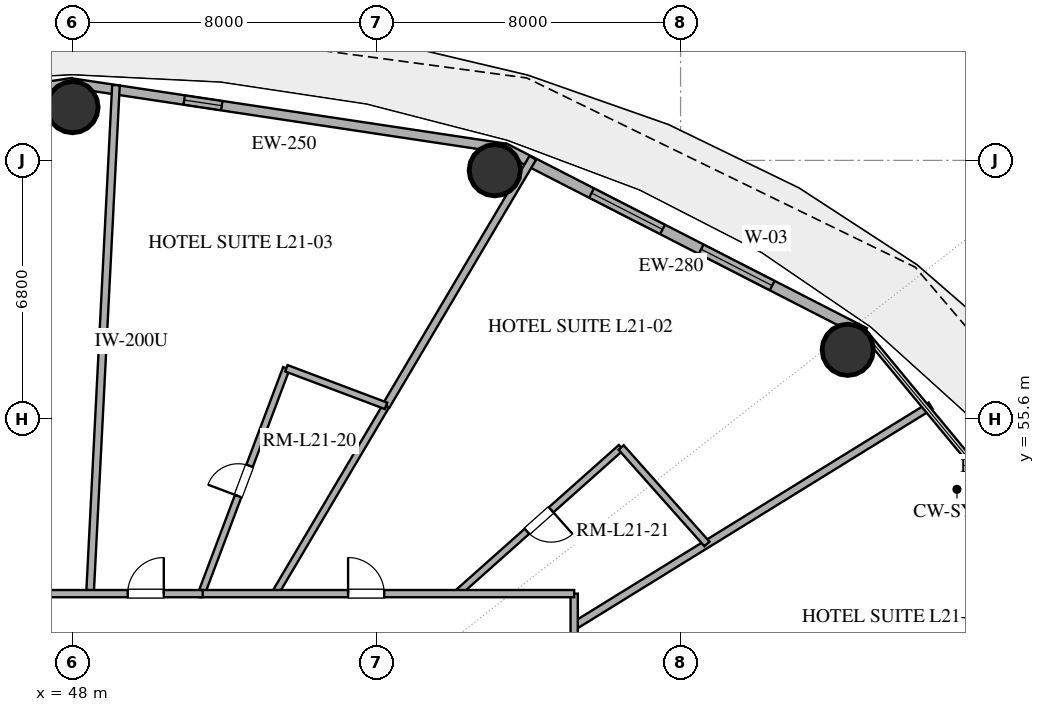
"""IFC4 building model, lengths in metres.
Left out: names, types, materials, properties, quantities, classifications, styles, units other than length and angle.
Written with IfcOpenShell. Run it as: python <this file> out.ifc"""

import sys

from ifc_helpers import new_model, si_unit, direction, frame, frame_2d, origin, origin_2d, place, context, subcontext, project, spatial, rectangle, hollow_circle, extrude, element, fill, save


model = new_model("IFC4")
c1 = context("Model", 3, precision=1e-05, world=origin(), true_north=direction((0.0, 1.0)))
c2 = subcontext(c1, "Body", "Model", "MODEL_VIEW")
j1 = project(units=[si_unit("LENGTHUNIT", "METRE"), si_unit("PLANEANGLEUNIT", "RADIAN")], contexts=[c1])
p1 = place(None, origin())
s1 = spatial("IfcSite", under=j1, at=p1, CompositionType="ELEMENT")
p2 = place(p1, origin())
s2 = spatial("IfcBuilding", under=s1, at=p2, CompositionType="ELEMENT")
p3 = place(p2, frame((0.0, 0.0, 87.6)))
s3 = spatial("IfcBuildingStorey", under=s2, at=p3, CompositionType="ELEMENT", Elevation=87.6)
for number, where, z_axis, x_axis in (
    (1, (68.398, 57.415, 0.0), (0.0, 0.0, 1.0), (1.0, 0.0, 0.0)),
    (2, (59.11, 62.141, 0.0), (0.0, 0.0, 1.0), (1.0, 0.0, 0.0)),
    (3, (48.0, 63.8, 0.0), (0.0, 0.0, 1.0), (1.0, 0.0, 0.0)),
):
    element("IfcColumn", number, at=place(p3, frame(where, z_axis=z_axis, x_axis=x_axis)), inside=s3, PredefinedType="COLUMN", context=c2, shape_type="SweptSolid", body=[
        extrude(hollow_circle(Radius=0.675, WallThickness=0.036, at=origin_2d()), origin(), (0.0, 0.0, 1.0), 3.38),
    ])
p4 = place(p3, frame((68.84, 57.86, 0.0), z_axis=(0.0, 0.0, 1.0), x_axis=(-0.889959505023, 0.45603955905, 0.0)))
e4 = element("IfcWall", 4, at=p4, inside=s3, PredefinedType="SOLIDWALL", context=c2, shape_type="SweptSolid", body=[
    extrude(rectangle(XDim=10.662, YDim=0.28, at=frame_2d((5.331, 0.0))), origin(), (0.0, 0.0, 1.0), 3.38),
])
p5 = place(p4, frame((2.731, 0.0, 0.85)))
e5 = element("IfcOpeningElement", 5, at=p5, cuts=e4, PredefinedType="OPENING", context=c2, shape_type="SweptSolid", body=[
    extrude(rectangle(XDim=2.1, YDim=2.2, at=frame_2d((1.05, 1.1))), frame((0.0, 0.15, 0.0), z_axis=(0.0, -1.0, 0.0), x_axis=(1.0, 0.0, 0.0)), (0.0, 0.0, 1.0), 0.3),
])
p6 = place(p4, frame((5.971, 0.0, 0.85)))
e6 = element("IfcOpeningElement", 6, at=p6, cuts=e4, PredefinedType="OPENING", context=c2, shape_type="SweptSolid", body=[
    extrude(rectangle(XDim=2.1, YDim=2.2, at=frame_2d((1.05, 1.1))), frame((0.0, 0.15, 0.0), z_axis=(0.0, -1.0, 0.0), x_axis=(1.0, 0.0, 0.0)), (0.0, 0.0, 1.0), 0.3),
])
p7 = place(p3, frame((59.351, 62.723, 0.0), z_axis=(0.0, 0.0, 1.0), x_axis=(-0.988877774656, 0.148730450117, 0.0)))
e7 = element("IfcWall", 7, at=p7, inside=s3, PredefinedType="SOLIDWALL", context=c2, shape_type="SweptSolid", body=[
    extrude(rectangle(XDim=11.479, YDim=0.25, at=frame_2d((5.74, 0.0))), origin(), (0.0, 0.0, 1.0), 3.38),
])
p8 = place(p7, frame((7.508, 0.0, 1.42)))
e8 = element("IfcOpeningElement", 8, at=p8, cuts=e7, PredefinedType="OPENING", context=c2, shape_type="SweptSolid", body=[
    extrude(rectangle(XDim=1.0, YDim=1.05, at=frame_2d((0.5, 0.525))), frame((0.0, 0.135, 0.0), z_axis=(0.0, -1.0, 0.0), x_axis=(1.0, 0.0, 0.0)), (0.0, 0.0, 1.0), 0.27),
])
p9 = place(p3, frame((48.0, 64.43, 0.0), z_axis=(0.0, 0.0, 1.0), x_axis=(-0.988877774656, -0.148730450117, 0.0)))
e9 = element("IfcWall", 9, at=p9, inside=s3, PredefinedType="SOLIDWALL", context=c2, shape_type="SweptSolid", body=[
    extrude(rectangle(XDim=11.479, YDim=0.28, at=frame_2d((5.74, 0.0))), origin(), (0.0, 0.0, 1.0), 3.38),
])
p10 = place(p9, frame((1.524, 0.0, 0.0)))
e10 = element("IfcOpeningElement", 10, at=p10, cuts=e9, PredefinedType="OPENING", context=c2, shape_type="SweptSolid", body=[
    extrude(rectangle(XDim=1.1, YDim=2.25, at=frame_2d((0.55, 1.125))), frame((0.0, 0.15, 0.0), z_axis=(0.0, -1.0, 0.0), x_axis=(1.0, 0.0, 0.0)), (0.0, 0.0, 1.0), 0.3),
])
p11 = place(p3, frame((49.143, 64.379, 0.0), z_axis=(0.0, 0.0, 1.0), x_axis=(-0.050973793346, -0.998699991185, 0.0)))
e11 = element("IfcWall", 11, at=p11, inside=s3, PredefinedType="PARTITIONING", context=c2, shape_type="SweptSolid", body=[
    extrude(rectangle(XDim=13.396, YDim=0.2, at=frame_2d((6.698, 0.0))), origin(), (0.0, 0.0, 1.0), 2.74),
])
p12 = place(p3, frame((60.112, 62.468, 0.0), z_axis=(0.0, 0.0, 1.0), x_axis=(-0.509263960295, -0.860610375689, 0.0)))
e12 = element("IfcWall", 12, at=p12, inside=s3, PredefinedType="PARTITIONING", context=c2, shape_type="SweptSolid", body=[
    extrude(rectangle(XDim=7.583, YDim=0.2, at=frame_2d((3.792, 0.0))), origin(), (0.0, 0.0, 1.0), 2.74),
])
p13 = place(p3, frame((61.2, 50.15, 0.0), z_axis=(0.0, 0.0, 1.0), x_axis=(0.850874276333, 0.525369361377, 0.0)))
e13 = element("IfcWall", 13, at=p13, inside=s3, PredefinedType="PARTITIONING", context=c2, shape_type="SweptSolid", body=[
    extrude(rectangle(XDim=11.026, YDim=0.2, at=frame_2d((5.513, 0.0))), origin(), (0.0, 0.0, 1.0), 2.74),
])
p14 = place(p3, frame((51.391, 51.0, 0.0), z_axis=(0.0, 0.0, 1.0), x_axis=(0.352583810303, 0.935780239539, 0.0)))
e14 = element("IfcWall", 14, at=p14, inside=s3, PredefinedType="PLUMBINGWALL", context=c2, shape_type="SweptSolid", body=[
    extrude(rectangle(XDim=6.337, YDim=0.18, at=frame_2d((3.168, 0.0))), origin(), (0.0, 0.0, 1.0), 2.74),
])
p15 = place(p14, frame((2.744, 0.0, 0.0)))
e15 = element("IfcOpeningElement", 15, at=p15, cuts=e14, PredefinedType="OPENING", context=c2, shape_type="SweptSolid", body=[
    extrude(rectangle(XDim=0.85, YDim=2.1, at=frame_2d((0.425, 1.05))), frame((0.0, 0.1, 0.0), z_axis=(0.0, -1.0, 0.0), x_axis=(1.0, 0.0, 0.0)), (0.0, 0.0, 1.0), 0.2),
])
p16 = place(p3, frame((62.436, 54.844, 0.0), z_axis=(0.0, 0.0, 1.0), x_axis=(-0.747085499985, -0.664727956168, 0.0)))
e16 = element("IfcWall", 16, at=p16, inside=s3, PredefinedType="PLUMBINGWALL", context=c2, shape_type="SweptSolid", body=[
    extrude(rectangle(XDim=5.783, YDim=0.18, at=frame_2d((2.892, 0.0))), origin(), (0.0, 0.0, 1.0), 2.74),
])
p17 = place(p16, frame((2.467, 0.0, 0.0)))
e17 = element("IfcOpeningElement", 17, at=p17, cuts=e16, PredefinedType="OPENING", context=c2, shape_type="SweptSolid", body=[
    extrude(rectangle(XDim=0.85, YDim=2.1, at=frame_2d((0.425, 1.05))), frame((0.0, 0.1, 0.0), z_axis=(0.0, -1.0, 0.0), x_axis=(1.0, 0.0, 0.0)), (0.0, 0.0, 1.0), 0.2),
])
p18 = place(p3, frame((56.25, 55.941, 0.0), z_axis=(0.0, 0.0, 1.0), x_axis=(-0.509296473297, -0.860591135376, 0.0)))
e18 = element("IfcWall", 18, at=p18, inside=s3, PredefinedType="PLUMBINGWALL", context=c2, shape_type="SweptSolid", body=[
    extrude(rectangle(XDim=5.742, YDim=0.18, at=frame_2d((2.871, 0.0))), origin(), (0.0, 0.0, 1.0), 2.74),
])
p19 = place(p3, frame((61.2, 51.0, 0.0), z_axis=(0.0, 0.0, 1.0), x_axis=(0.0, -1.0, 0.0)))
e19 = element("IfcWall", 19, at=p19, inside=s3, PredefinedType="PARTITIONING", context=c2, shape_type="SweptSolid", body=[
    extrude(rectangle(XDim=8.109, YDim=0.19, at=frame_2d((4.055, 0.0))), origin(), (0.0, 0.0, 1.0), 2.74),
])
p20 = place(p19, frame((2.806, 0.0, 0.0)))
e20 = element("IfcOpeningElement", 20, at=p20, cuts=e19, PredefinedType="OPENING", context=c2, shape_type="SweptSolid", body=[
    extrude(rectangle(XDim=0.95, YDim=2.15, at=frame_2d((0.475, 1.075))), frame((0.0, 0.105, 0.0), z_axis=(0.0, -1.0, 0.0), x_axis=(1.0, 0.0, 0.0)), (0.0, 0.0, 1.0), 0.21),
])
p21 = place(p3, frame((51.357, 51.0, 0.0), z_axis=(0.0, 0.0, 1.0), x_axis=(1.0, 0.0, 0.0)))
e21 = element("IfcWall", 21, at=p21, inside=s3, PredefinedType="PARTITIONING", context=c2, shape_type="SweptSolid", body=[
    extrude(rectangle(XDim=9.843, YDim=0.19, at=frame_2d((4.921, 0.0))), origin(), (0.0, 0.0, 1.0), 2.74),
])
p22 = place(p21, frame((3.894, 0.0, 0.0)))
e22 = element("IfcOpeningElement", 22, at=p22, cuts=e21, PredefinedType="OPENING", context=c2, shape_type="SweptSolid", body=[
    extrude(rectangle(XDim=0.95, YDim=2.15, at=frame_2d((0.475, 1.075))), frame((0.0, 0.105, 0.0), z_axis=(0.0, -1.0, 0.0), x_axis=(1.0, 0.0, 0.0)), (0.0, 0.0, 1.0), 0.21),
])
p23 = place(p3, frame((43.812, 51.0, 0.0), z_axis=(0.0, 0.0, 1.0), x_axis=(1.0, 0.0, 0.0)))
e23 = element("IfcWall", 23, at=p23, inside=s3, PredefinedType="PARTITIONING", context=c2, shape_type="SweptSolid", body=[
    extrude(rectangle(XDim=7.613, YDim=0.19, at=frame_2d((3.807, 0.0))), origin(), (0.0, 0.0, 1.0), 2.74),
])
p24 = place(p23, frame((1.84, 0.0, 0.0)))
e24 = element("IfcOpeningElement", 24, at=p24, cuts=e23, PredefinedType="OPENING", context=c2, shape_type="SweptSolid", body=[
    extrude(rectangle(XDim=1.0, YDim=2.2, at=frame_2d((0.5, 1.1))), frame((0.0, 0.105, 0.0), z_axis=(0.0, -1.0, 0.0), x_axis=(1.0, 0.0, 0.0)), (0.0, 0.0, 1.0), 0.21),
])
p25 = place(p23, frame((5.639, 0.0, 0.0)))
e25 = element("IfcOpeningElement", 25, at=p25, cuts=e23, PredefinedType="OPENING", context=c2, shape_type="SweptSolid", body=[
    extrude(rectangle(XDim=0.95, YDim=2.15, at=frame_2d((0.475, 1.075))), frame((0.0, 0.105, 0.0), z_axis=(0.0, -1.0, 0.0), x_axis=(1.0, 0.0, 0.0)), (0.0, 0.0, 1.0), 0.21),
])
p26 = place(p3, frame((64.694, 52.307, 0.0), z_axis=(0.0, 0.0, 1.0), x_axis=(-0.664720670732, 0.747091982222, 0.0)))
e26 = element("IfcWall", 26, at=p26, inside=s3, PredefinedType="PLUMBINGWALL", context=c2, shape_type="SweptSolid", body=[
    extrude(rectangle(XDim=3.397, YDim=0.18, at=frame_2d((1.698, 0.0))), origin(), (0.0, 0.0, 1.0), 2.74),
])
p27 = place(p3, frame((53.625, 56.93, 0.0), z_axis=(0.0, 0.0, 1.0), x_axis=(0.93579147225, -0.352553996522, 0.0)))
e27 = element("IfcWall", 27, at=p27, inside=s3, PredefinedType="PLUMBINGWALL", context=c2, shape_type="SweptSolid", body=[
    extrude(rectangle(XDim=2.805, YDim=0.18, at=frame_2d((1.402, 0.0))), origin(), (0.0, 0.0, 1.0), 2.74),
])
p28 = place(p5, origin())
e28 = element("IfcWindow", 28, at=p28, inside=s3, PartitioningType="SINGLE_PANEL", PredefinedType="WINDOW", context=c2, shape_type="SweptSolid", body=[
    extrude(rectangle(XDim=2.1, YDim=2.2, at=frame_2d((1.05, 1.1))), frame((0.0, 0.03, 0.0), z_axis=(0.0, -1.0, 0.0), x_axis=(1.0, 0.0, 0.0)), (0.0, 0.0, 1.0), 0.06),
])
fill(e5, e28)
p29 = place(p6, origin())
e29 = element("IfcWindow", 29, at=p29, inside=s3, PartitioningType="SINGLE_PANEL", PredefinedType="WINDOW", context=c2, shape_type="SweptSolid", body=[
    extrude(rectangle(XDim=2.1, YDim=2.2, at=frame_2d((1.05, 1.1))), frame((0.0, 0.03, 0.0), z_axis=(0.0, -1.0, 0.0), x_axis=(1.0, 0.0, 0.0)), (0.0, 0.0, 1.0), 0.06),
])
fill(e6, e29)
p30 = place(p8, origin())
e30 = element("IfcWindow", 30, at=p30, inside=s3, PartitioningType="SINGLE_PANEL", PredefinedType="WINDOW", context=c2, shape_type="SweptSolid", body=[
    extrude(rectangle(XDim=1.0, YDim=1.05, at=frame_2d((0.5, 0.525))), frame((0.0, 0.03, 0.0), z_axis=(0.0, -1.0, 0.0), x_axis=(1.0, 0.0, 0.0)), (0.0, 0.0, 1.0), 0.06),
])
fill(e8, e30)
p31 = place(p15, origin())
e31 = element("IfcDoor", 31, at=p31, inside=s3, OperationType="SINGLE_SWING_LEFT", PredefinedType="DOOR", context=c2, shape_type="SweptSolid", body=[
    extrude(rectangle(XDim=0.85, YDim=2.1, at=frame_2d((0.425, 1.05))), frame((0.0, 0.025, 0.0), z_axis=(0.0, -1.0, 0.0), x_axis=(1.0, 0.0, 0.0)), (0.0, 0.0, 1.0), 0.05),
])
fill(e15, e31)
p32 = place(p17, origin())
e32 = element("IfcDoor", 32, at=p32, inside=s3, OperationType="SINGLE_SWING_LEFT", PredefinedType="DOOR", context=c2, shape_type="SweptSolid", body=[
    extrude(rectangle(XDim=0.85, YDim=2.1, at=frame_2d((0.425, 1.05))), frame((0.0, 0.025, 0.0), z_axis=(0.0, -1.0, 0.0), x_axis=(1.0, 0.0, 0.0)), (0.0, 0.0, 1.0), 0.05),
])
fill(e17, e32)
p33 = place(p22, origin())
e33 = element("IfcDoor", 33, at=p33, inside=s3, OperationType="SINGLE_SWING_LEFT", PredefinedType="DOOR", context=c2, shape_type="SweptSolid", body=[
    extrude(rectangle(XDim=0.95, YDim=2.15, at=frame_2d((0.475, 1.075))), frame((0.0, 0.025, 0.0), z_axis=(0.0, -1.0, 0.0), x_axis=(1.0, 0.0, 0.0)), (0.0, 0.0, 1.0), 0.05),
])
fill(e22, e33)
p34 = place(p25, origin())
e34 = element("IfcDoor", 34, at=p34, inside=s3, OperationType="SINGLE_SWING_RIGHT", PredefinedType="DOOR", context=c2, shape_type="SweptSolid", body=[
    extrude(rectangle(XDim=0.95, YDim=2.15, at=frame_2d((0.475, 1.075))), frame((0.0, 0.025, 0.0), z_axis=(0.0, -1.0, 0.0), x_axis=(1.0, 0.0, 0.0)), (0.0, 0.0, 1.0), 0.05),
])
fill(e25, e34)
save(model, sys.argv[1])
